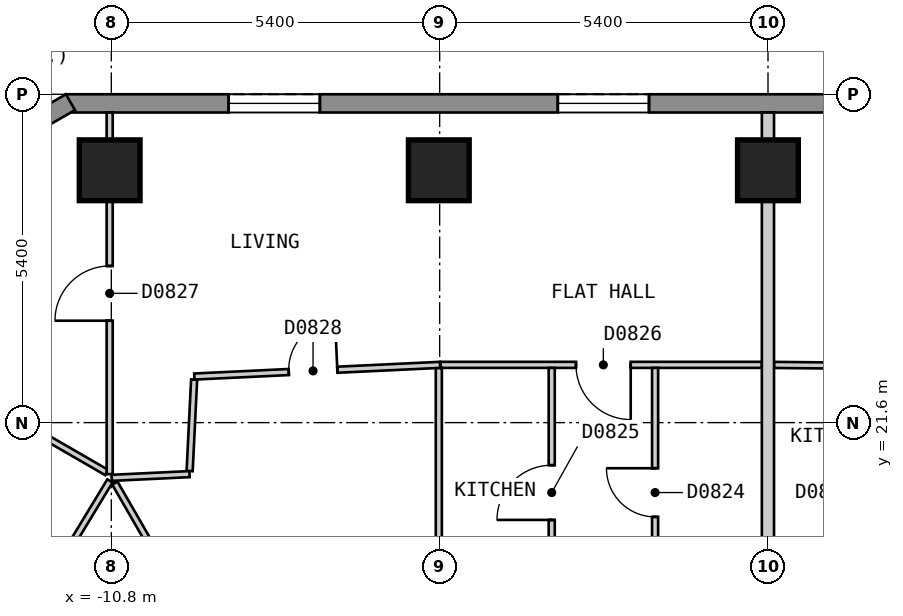
"""IFC4 building model, lengths in metres.
Left out: names, types, materials, properties, quantities, classifications, styles, units other than length and angle.
Written with IfcOpenShell. Run it as: python <this file> out.ifc"""

import sys

from ifc_helpers import new_model, si_unit, direction, frame, frame_2d, origin, origin_2d, place, context, subcontext, project, spatial, polyline, rectangle, outline, extrude, element, fill, save


model = new_model("IFC4")
c1 = context("Model", 3, precision=1e-05, world=origin(), true_north=direction((0.0, 1.0)))
c2 = subcontext(c1, "Body", "Model", "MODEL_VIEW")
j1 = project(units=[si_unit("LENGTHUNIT", "METRE"), si_unit("PLANEANGLEUNIT", "RADIAN")], contexts=[c1])
p1 = place(None, origin())
s1 = spatial("IfcSite", under=j1, at=p1, CompositionType="ELEMENT")
p2 = place(p1, origin())
s2 = spatial("IfcBuilding", under=s1, at=p2, CompositionType="ELEMENT")
p3 = place(p2, frame((0.0, 0.0, 84.0)))
s3 = spatial("IfcBuildingStorey", under=s2, at=p3, CompositionType="ELEMENT", Elevation=84.0)
for number, where, z_axis, x_axis in (
    (1, (-0.001, 25.75, 0.0), (0.0, 0.0, 1.0), (-1.0, 0.0, 0.0)),
    (2, (-5.414, 25.75, 0.0), (0.0, 0.0, 1.0), (-1.0, 0.0, 0.0)),
    (3, (-10.827, 25.75, 0.0), (0.0, 0.0, 1.0), (-1.0, 0.0, 0.0)),
):
    element("IfcColumn", number, at=place(p3, frame(where, z_axis=z_axis, x_axis=x_axis)), inside=s3, PredefinedType="COLUMN", context=c2, shape_type="SweptSolid", body=[
        extrude(rectangle(XDim=1.0, YDim=1.0, at=origin_2d()), origin(), (0.0, 0.0, 1.0), 3.0),
    ])
p4 = place(p3, frame((11.547, 26.85, 0.0), z_axis=(0.0, 0.0, 1.0), x_axis=(-1.0, 0.0, 0.0)))
e4 = element("IfcWall", 4, at=p4, inside=s3, PredefinedType="SOLIDWALL", context=c2, shape_type="SweptSolid", body=[
    extrude(outline(polyline([(0.0, -0.15), (23.094, -0.15), (23.014, 0.15), (0.08, 0.15), (0.0, -0.15)])), origin(), (0.0, 0.0, 1.0), 2.7),
])
p5 = place(p4, frame((2.678, 0.0, 0.15)))
e5 = element("IfcOpeningElement", 5, at=p5, cuts=e4, PredefinedType="OPENING", context=c2, shape_type="SweptSolid", body=[
    extrude(rectangle(XDim=1.5, YDim=2.1, at=frame_2d((0.75, 1.05))), frame((0.0, 0.16, 0.0), z_axis=(0.0, -1.0, 0.0), x_axis=(1.0, 0.0, 0.0)), (0.0, 0.0, 1.0), 0.32),
])
p6 = place(p4, frame((8.092, 0.0, 0.15)))
e6 = element("IfcOpeningElement", 6, at=p6, cuts=e4, PredefinedType="OPENING", context=c2, shape_type="SweptSolid", body=[
    extrude(rectangle(XDim=1.5, YDim=2.1, at=frame_2d((0.75, 1.05))), frame((0.0, 0.16, 0.0), z_axis=(0.0, -1.0, 0.0), x_axis=(1.0, 0.0, 0.0)), (0.0, 0.0, 1.0), 0.32),
])
p7 = place(p4, frame((13.504, 0.0, 0.15)))
e7 = element("IfcOpeningElement", 7, at=p7, cuts=e4, PredefinedType="OPENING", context=c2, shape_type="SweptSolid", body=[
    extrude(rectangle(XDim=1.5, YDim=2.1, at=frame_2d((0.75, 1.05))), frame((0.0, 0.16, 0.0), z_axis=(0.0, -1.0, 0.0), x_axis=(1.0, 0.0, 0.0)), (0.0, 0.0, 1.0), 0.32),
])
p8 = place(p4, frame((18.917, 0.0, 0.15)))
e8 = element("IfcOpeningElement", 8, at=p8, cuts=e4, PredefinedType="OPENING", context=c2, shape_type="SweptSolid", body=[
    extrude(rectangle(XDim=1.5, YDim=2.1, at=frame_2d((0.75, 1.05))), frame((0.0, 0.16, 0.0), z_axis=(0.0, -1.0, 0.0), x_axis=(1.0, 0.0, 0.0)), (0.0, 0.0, 1.0), 0.32),
])
p9 = place(p3, frame((-11.472, 26.87, 0.0), z_axis=(0.0, 0.0, 1.0), x_axis=(-0.866022959057, -0.500004234368, 0.0)))
e9 = element("IfcWall", 9, at=p9, inside=s3, PredefinedType="SOLIDWALL", context=c2, shape_type="SweptSolid", body=[
    extrude(outline(polyline([(0.0, -0.15), (5.0, -0.15), (4.92, 0.15), (0.08, 0.15), (0.0, -0.15)])), origin(), (0.0, 0.0, 1.0), 2.7),
])
p10 = place(p9, frame((0.65, 0.0, 0.15)))
e10 = element("IfcOpeningElement", 10, at=p10, cuts=e9, PredefinedType="OPENING", context=c2, shape_type="SweptSolid", body=[
    extrude(rectangle(XDim=1.2, YDim=2.1, at=frame_2d((0.6, 1.05))), frame((0.0, 0.16, 0.0), z_axis=(0.0, -1.0, 0.0), x_axis=(1.0, 0.0, 0.0)), (0.0, 0.0, 1.0), 0.32),
])
p11 = place(p3, frame((0.099, 22.549, 0.0), z_axis=(0.0, 0.0, 1.0), x_axis=(0.99995279897, -0.009715957599, 0.0)))
e11 = element("IfcWall", 11, at=p11, inside=s3, PredefinedType="PARTITIONING", context=c2, shape_type="SweptSolid", body=[
    extrude(rectangle(XDim=2.161, YDim=0.1, at=frame_2d((1.081, 0.0))), origin(), (0.0, 0.0, 1.0), 2.7),
])
p12 = place(p3, frame((-10.742, 20.606, 0.0), z_axis=(0.0, 0.0, 1.0), x_axis=(0.50003312339, -0.866006279142, 0.0)))
e12 = element("IfcWall", 12, at=p12, inside=s3, PredefinedType="PARTITIONING", context=c2, shape_type="SweptSolid", body=[
    extrude(rectangle(XDim=4.626, YDim=0.1, at=frame_2d((2.313, 0.0))), origin(), (0.0, 0.0, 1.0), 2.7),
])
p13 = place(p3, frame((-15.977, 23.725, 0.0), z_axis=(0.0, 0.0, 1.0), x_axis=(0.866028213039, -0.499995134196, 0.0)))
e13 = element("IfcWall", 13, at=p13, inside=s3, PredefinedType="PARTITIONING", context=c2, shape_type="SweptSolid", body=[
    extrude(rectangle(XDim=5.89, YDim=0.1, at=frame_2d((2.945, 0.0))), origin(), (0.0, 0.0, 1.0), 2.7),
])
p14 = place(p13, frame((2.524, 0.0, 0.0)))
e14 = element("IfcOpeningElement", 14, at=p14, cuts=e13, PredefinedType="OPENING", context=c2, shape_type="SweptSolid", body=[
    extrude(rectangle(XDim=0.9, YDim=2.1, at=frame_2d((0.45, 1.05))), frame((0.0, 0.06, 0.0), z_axis=(0.0, -1.0, 0.0), x_axis=(1.0, 0.0, 0.0)), (0.0, 0.0, 1.0), 0.12),
])
p15 = place(p3, frame((-5.384, 22.55, 0.0), z_axis=(0.0, 0.0, 1.0), x_axis=(1.0, 0.0, 0.0)))
e15 = element("IfcWall", 15, at=p15, inside=s3, PredefinedType="PARTITIONING", context=c2, shape_type="SweptSolid", body=[
    extrude(rectangle(XDim=5.283, YDim=0.1, at=frame_2d((2.642, 0.0))), origin(), (0.0, 0.0, 1.0), 2.7),
])
p16 = place(p15, frame((2.226, 0.0, 0.0)))
e16 = element("IfcOpeningElement", 16, at=p16, cuts=e15, PredefinedType="OPENING", context=c2, shape_type="SweptSolid", body=[
    extrude(rectangle(XDim=0.9, YDim=2.1, at=frame_2d((0.45, 1.05))), frame((0.0, 0.06, 0.0), z_axis=(0.0, -1.0, 0.0), x_axis=(1.0, 0.0, 0.0)), (0.0, 0.0, 1.0), 0.12),
])
p17 = place(p3, frame((-13.328, 16.511, 0.0), z_axis=(0.0, 0.0, 1.0), x_axis=(0.518570528669, 0.855034857065, 0.0)))
e17 = element("IfcWall", 17, at=p17, inside=s3, PredefinedType="PARTITIONING", context=c2, shape_type="SweptSolid", body=[
    extrude(rectangle(XDim=4.83, YDim=0.1, at=frame_2d((2.415, 0.0))), origin(), (0.0, 0.0, 1.0), 2.7),
])
p18 = place(p17, frame((1.995, 0.0, 0.0)))
e18 = element("IfcOpeningElement", 18, at=p18, cuts=e17, PredefinedType="OPENING", context=c2, shape_type="SweptSolid", body=[
    extrude(rectangle(XDim=0.8, YDim=2.1, at=frame_2d((0.4, 1.05))), frame((0.0, 0.06, 0.0), z_axis=(0.0, -1.0, 0.0), x_axis=(1.0, 0.0, 0.0)), (0.0, 0.0, 1.0), 0.12),
])
p19 = place(p3, frame((-9.512, 20.803, 0.0), z_axis=(0.0, 0.0, 1.0), x_axis=(0.049089165168, 0.998794400196, 0.0)))
e19 = element("IfcWall", 19, at=p19, inside=s3, PredefinedType="PARTITIONING", context=c2, shape_type="SweptSolid", body=[
    extrude(rectangle(XDim=1.507, YDim=0.1, at=frame_2d((0.753, 0.0))), origin(), (0.0, 0.0, 1.0), 2.7),
])
p20 = place(p3, frame((-3.557, 18.45, 0.0), z_axis=(0.0, 0.0, 1.0), x_axis=(0.0, 1.0, 0.0)))
e20 = element("IfcWall", 20, at=p20, inside=s3, PredefinedType="PARTITIONING", context=c2, shape_type="SweptSolid", body=[
    extrude(rectangle(XDim=4.05, YDim=0.1, at=frame_2d((2.025, 0.0))), origin(), (0.0, 0.0, 1.0), 2.7),
])
p21 = place(p20, frame((1.55, 0.0, 0.0)))
e21 = element("IfcOpeningElement", 21, at=p21, cuts=e20, PredefinedType="OPENING", context=c2, shape_type="SweptSolid", body=[
    extrude(rectangle(XDim=0.9, YDim=2.1, at=frame_2d((0.45, 1.05))), frame((0.0, 0.06, 0.0), z_axis=(0.0, -1.0, 0.0), x_axis=(1.0, 0.0, 0.0)), (0.0, 0.0, 1.0), 0.12),
])
p22 = place(p3, frame((-5.414, 18.35, 0.0), z_axis=(0.0, 0.0, 1.0), x_axis=(0.0, 1.0, 0.0)))
e22 = element("IfcWall", 22, at=p22, inside=s3, PredefinedType="PARTITIONING", context=c2, shape_type="SweptSolid", body=[
    extrude(rectangle(XDim=4.15, YDim=0.1, at=frame_2d((2.075, 0.0))), origin(), (0.0, 0.0, 1.0), 2.7),
])
p23 = place(p3, frame((-10.827, 20.753, 0.0), z_axis=(0.0, 0.0, 1.0), x_axis=(0.0, 1.0, 0.0)))
e23 = element("IfcWall", 23, at=p23, inside=s3, PredefinedType="PARTITIONING", context=c2, shape_type="SweptSolid", body=[
    extrude(rectangle(XDim=5.947, YDim=0.1, at=frame_2d((2.974, 0.0))), origin(), (0.0, 0.0, 1.0), 2.7),
])
p24 = place(p23, frame((2.523, 0.0, 0.0)))
e24 = element("IfcOpeningElement", 24, at=p24, cuts=e23, PredefinedType="OPENING", context=c2, shape_type="SweptSolid", body=[
    extrude(rectangle(XDim=0.9, YDim=2.1, at=frame_2d((0.45, 1.05))), frame((0.0, 0.06, 0.0), z_axis=(0.0, -1.0, 0.0), x_axis=(1.0, 0.0, 0.0)), (0.0, 0.0, 1.0), 0.12),
])
p25 = place(p3, frame((-1.857, 18.45, 0.0), z_axis=(0.0, 0.0, 1.0), x_axis=(0.0, 1.0, 0.0)))
e25 = element("IfcWall", 25, at=p25, inside=s3, PredefinedType="PARTITIONING", context=c2, shape_type="SweptSolid", body=[
    extrude(rectangle(XDim=4.05, YDim=0.1, at=frame_2d((2.025, 0.0))), origin(), (0.0, 0.0, 1.0), 2.7),
])
p26 = place(p25, frame((1.6, 0.0, 0.0)))
e26 = element("IfcOpeningElement", 26, at=p26, cuts=e25, PredefinedType="OPENING", context=c2, shape_type="SweptSolid", body=[
    extrude(rectangle(XDim=0.8, YDim=2.1, at=frame_2d((0.4, 1.05))), frame((0.0, 0.06, 0.0), z_axis=(0.0, -1.0, 0.0), x_axis=(1.0, 0.0, 0.0)), (0.0, 0.0, 1.0), 0.12),
])
p27 = place(p3, frame((-10.792, 20.692, 0.0), z_axis=(0.0, 0.0, 1.0), x_axis=(0.998861653202, 0.04770112957, 0.0)))
e27 = element("IfcWall", 27, at=p27, inside=s3, PredefinedType="PARTITIONING", context=c2, shape_type="SweptSolid", body=[
    extrude(rectangle(XDim=1.28, YDim=0.1, at=frame_2d((0.64, 0.0))), origin(), (0.0, 0.0, 1.0), 2.7),
])
p28 = place(p3, frame((-9.435, 22.358, 0.0), z_axis=(0.0, 0.0, 1.0), x_axis=(0.998871548472, 0.04749346959, 0.0)))
e28 = element("IfcWall", 28, at=p28, inside=s3, PredefinedType="PARTITIONING", context=c2, shape_type="SweptSolid", body=[
    extrude(rectangle(XDim=4.046, YDim=0.1, at=frame_2d((2.023, 0.0))), origin(), (0.0, 0.0, 1.0), 2.7),
])
p29 = place(p28, frame((1.555, 0.0, 0.0)))
e29 = element("IfcOpeningElement", 29, at=p29, cuts=e28, PredefinedType="OPENING", context=c2, shape_type="SweptSolid", body=[
    extrude(rectangle(XDim=0.8, YDim=2.1, at=frame_2d((0.4, 1.05))), frame((0.0, 0.06, 0.0), z_axis=(0.0, -1.0, 0.0), x_axis=(1.0, 0.0, 0.0)), (0.0, 0.0, 1.0), 0.12),
])
p30 = place(p3, frame((-0.001, 18.45, 0.0), z_axis=(0.0, 0.0, 1.0), x_axis=(0.0, 1.0, 0.0)))
e30 = element("IfcWall", 30, at=p30, inside=s3, PredefinedType="PARTITIONING", context=c2, shape_type="SweptSolid", body=[
    extrude(rectangle(XDim=8.25, YDim=0.2, at=frame_2d((4.125, 0.0))), origin(), (0.0, 0.0, 1.0), 2.7),
])
p31 = place(p7, origin())
e31 = element("IfcWindow", 31, at=p31, inside=s3, PartitioningType="SINGLE_PANEL", PredefinedType="WINDOW", context=c2, shape_type="SweptSolid", body=[
    extrude(rectangle(XDim=1.5, YDim=2.1, at=frame_2d((0.75, 1.05))), frame((0.0, 0.03, 0.0), z_axis=(0.0, -1.0, 0.0), x_axis=(1.0, 0.0, 0.0)), (0.0, 0.0, 1.0), 0.06),
])
fill(e7, e31)
p32 = place(p8, origin())
e32 = element("IfcWindow", 32, at=p32, inside=s3, PartitioningType="SINGLE_PANEL", PredefinedType="WINDOW", context=c2, shape_type="SweptSolid", body=[
    extrude(rectangle(XDim=1.5, YDim=2.1, at=frame_2d((0.75, 1.05))), frame((0.0, 0.03, 0.0), z_axis=(0.0, -1.0, 0.0), x_axis=(1.0, 0.0, 0.0)), (0.0, 0.0, 1.0), 0.06),
])
fill(e8, e32)
p33 = place(p26, origin())
e33 = element("IfcDoor", 33, at=p33, inside=s3, OperationType="SINGLE_SWING_RIGHT", PredefinedType="DOOR", context=c2, shape_type="SweptSolid", body=[
    extrude(rectangle(XDim=0.8, YDim=2.1, at=frame_2d((0.4, 1.05))), frame((0.0, 0.025, 0.0), z_axis=(0.0, -1.0, 0.0), x_axis=(1.0, 0.0, 0.0)), (0.0, 0.0, 1.0), 0.05),
])
fill(e26, e33)
p34 = place(p21, origin())
e34 = element("IfcDoor", 34, at=p34, inside=s3, OperationType="SINGLE_SWING_LEFT", PredefinedType="DOOR", context=c2, shape_type="SweptSolid", body=[
    extrude(rectangle(XDim=0.9, YDim=2.1, at=frame_2d((0.45, 1.05))), frame((0.0, 0.025, 0.0), z_axis=(0.0, -1.0, 0.0), x_axis=(1.0, 0.0, 0.0)), (0.0, 0.0, 1.0), 0.05),
])
fill(e21, e34)
p35 = place(p16, origin())
e35 = element("IfcDoor", 35, at=p35, inside=s3, OperationType="SINGLE_SWING_RIGHT", PredefinedType="DOOR", context=c2, shape_type="SweptSolid", body=[
    extrude(rectangle(XDim=0.9, YDim=2.1, at=frame_2d((0.45, 1.05))), frame((0.0, 0.025, 0.0), z_axis=(0.0, -1.0, 0.0), x_axis=(1.0, 0.0, 0.0)), (0.0, 0.0, 1.0), 0.05),
])
fill(e16, e35)
p36 = place(p24, origin())
e36 = element("IfcDoor", 36, at=p36, inside=s3, OperationType="SINGLE_SWING_LEFT", PredefinedType="DOOR", context=c2, shape_type="SweptSolid", body=[
    extrude(rectangle(XDim=0.9, YDim=2.1, at=frame_2d((0.45, 1.05))), frame((0.0, 0.025, 0.0), z_axis=(0.0, -1.0, 0.0), x_axis=(1.0, 0.0, 0.0)), (0.0, 0.0, 1.0), 0.05),
])
fill(e24, e36)
p37 = place(p29, origin())
e37 = element("IfcDoor", 37, at=p37, inside=s3, OperationType="SINGLE_SWING_RIGHT", PredefinedType="DOOR", context=c2, shape_type="SweptSolid", body=[
    extrude(rectangle(XDim=0.8, YDim=2.1, at=frame_2d((0.4, 1.05))), frame((0.0, 0.025, 0.0), z_axis=(0.0, -1.0, 0.0), x_axis=(1.0, 0.0, 0.0)), (0.0, 0.0, 1.0), 0.05),
])
fill(e29, e37)
save(model, sys.argv[1])
